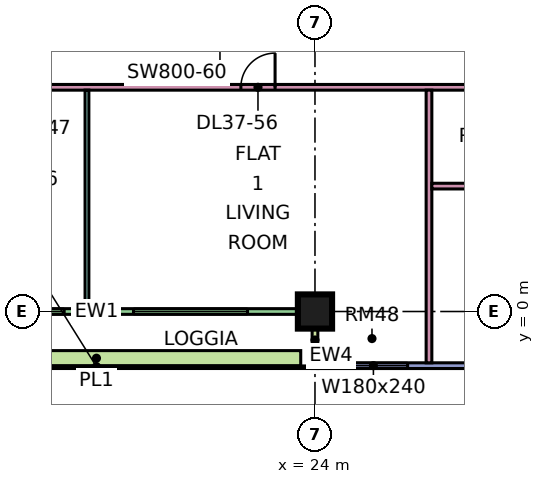
"""IFC4 building model, lengths in metres.
Left out: names, types, materials, properties, quantities, classifications, styles, units other than length and angle.
Written with IfcOpenShell. Run it as: python <this file> out.ifc"""

import sys

from ifc_helpers import new_model, si_unit, direction, frame, frame_2d, origin, origin_2d, place, context, subcontext, project, spatial, rectangle, extrude, element, fill, save


model = new_model("IFC4")
c1 = context("Model", 3, precision=1e-05, world=origin(), true_north=direction((0.0, 1.0)))
c2 = subcontext(c1, "Body", "Model", "MODEL_VIEW")
j1 = project(units=[si_unit("LENGTHUNIT", "METRE"), si_unit("PLANEANGLEUNIT", "RADIAN")], contexts=[c1])
p1 = place(None, origin())
s1 = spatial("IfcSite", under=j1, at=p1, CompositionType="ELEMENT")
p2 = place(p1, origin())
s2 = spatial("IfcBuilding", under=s1, at=p2, CompositionType="ELEMENT")
p3 = place(p2, frame((0.0, 0.0, 164.9)))
s3 = spatial("IfcBuildingStorey", under=s2, at=p3, CompositionType="ELEMENT", Elevation=164.9)
p4 = place(p3, frame((24.0, 0.0, 0.0), z_axis=(0.0, 0.0, 1.0), x_axis=(1.0, 0.0, 0.0)))
e1 = element("IfcColumn", 1, at=p4, inside=s3, PredefinedType="COLUMN", context=c2, shape_type="SweptSolid", body=[
    extrude(rectangle(XDim=0.9, YDim=0.9, at=origin_2d()), origin(), (0.0, 0.0, 1.0), 3.75),
])
p5 = place(p3, frame((12.575, 0.0, 0.0), z_axis=(0.0, 0.0, 1.0), x_axis=(1.0, 0.0, 0.0)))
e2 = element("IfcWall", 2, at=p5, inside=s3, PredefinedType="SOLIDWALL", context=c2, shape_type="SweptSolid", body=[
    extrude(rectangle(XDim=11.35, YDim=0.15, at=frame_2d((5.675, 0.0))), origin(), (0.0, 0.0, 1.0), 3.35),
])
p6 = place(p5, frame((0.613, 0.0, 0.0)))
e3 = element("IfcOpeningElement", 3, at=p6, cuts=e2, PredefinedType="OPENING", context=c2, shape_type="SweptSolid", body=[
    extrude(rectangle(XDim=1.2, YDim=2.4, at=frame_2d((0.6, 1.2))), frame((0.0, 0.085, 0.0), z_axis=(0.0, -1.0, 0.0), x_axis=(1.0, 0.0, 0.0)), (0.0, 0.0, 1.0), 0.17),
])
p7 = place(p5, frame((3.025, 0.0, 0.45)))
e4 = element("IfcOpeningElement", 4, at=p7, cuts=e2, PredefinedType="OPENING", context=c2, shape_type="SweptSolid", body=[
    extrude(rectangle(XDim=1.8, YDim=2.4, at=frame_2d((0.9, 1.2))), frame((0.0, 0.085, 0.0), z_axis=(0.0, -1.0, 0.0), x_axis=(1.0, 0.0, 0.0)), (0.0, 0.0, 1.0), 0.17),
])
p8 = place(p5, frame((6.65, 0.0, 0.45)))
e5 = element("IfcOpeningElement", 5, at=p8, cuts=e2, PredefinedType="OPENING", context=c2, shape_type="SweptSolid", body=[
    extrude(rectangle(XDim=3.0, YDim=2.4, at=frame_2d((1.5, 1.2))), frame((0.0, 0.085, 0.0), z_axis=(0.0, -1.0, 0.0), x_axis=(1.0, 0.0, 0.0)), (0.0, 0.0, 1.0), 0.17),
])
p9 = place(p3, frame((24.0, -1.5, 0.0), z_axis=(0.0, 0.0, 1.0), x_axis=(0.0, 1.0, 0.0)))
e6 = element("IfcWall", 6, at=p9, inside=s3, PredefinedType="SOLIDWALL", context=c2, shape_type="SweptSolid", body=[
    extrude(rectangle(XDim=1.5, YDim=0.15, at=frame_2d((0.75, 0.0))), origin(), (0.0, 0.0, 1.0), 3.35),
])
p10 = place(p3, frame((24.075, -1.425, 0.0), z_axis=(0.0, 0.0, 1.0), x_axis=(1.0, 0.0, 0.0)))
e7 = element("IfcWall", 7, at=p10, inside=s3, PredefinedType="SOLIDWALL", context=c2, shape_type="SweptSolid", body=[
    extrude(rectangle(XDim=11.85, YDim=0.15, at=frame_2d((5.925, 0.0))), origin(), (0.0, 0.0, 1.0), 3.35),
])
p11 = place(p10, frame((0.562, 0.0, 0.45)))
e8 = element("IfcOpeningElement", 8, at=p11, cuts=e7, PredefinedType="OPENING", context=c2, shape_type="SweptSolid", body=[
    extrude(rectangle(XDim=1.8, YDim=2.4, at=frame_2d((0.9, 1.2))), frame((0.0, 0.085, 0.0), z_axis=(0.0, -1.0, 0.0), x_axis=(1.0, 0.0, 0.0)), (0.0, 0.0, 1.0), 0.17),
])
p12 = place(p10, frame((4.425, 0.0, 0.45)))
e9 = element("IfcOpeningElement", 9, at=p12, cuts=e7, PredefinedType="OPENING", context=c2, shape_type="SweptSolid", body=[
    extrude(rectangle(XDim=3.0, YDim=2.4, at=frame_2d((1.5, 1.2))), frame((0.0, 0.085, 0.0), z_axis=(0.0, -1.0, 0.0), x_axis=(1.0, 0.0, 0.0)), (0.0, 0.0, 1.0), 0.17),
])
p13 = place(p10, frame((9.488, 0.0, 0.45)))
e10 = element("IfcOpeningElement", 10, at=p13, cuts=e7, PredefinedType="OPENING", context=c2, shape_type="SweptSolid", body=[
    extrude(rectangle(XDim=1.8, YDim=2.4, at=frame_2d((0.9, 1.2))), frame((0.0, 0.085, 0.0), z_axis=(0.0, -1.0, 0.0), x_axis=(1.0, 0.0, 0.0)), (0.0, 0.0, 1.0), 0.17),
])
p14 = place(p3, frame((12.875, -1.229, 0.0), z_axis=(0.0, 0.0, 1.0), x_axis=(1.0, 0.0, 0.0)))
e11 = element("IfcWall", 11, at=p14, inside=s3, PredefinedType="SOLIDWALL", context=c2, shape_type="SweptSolid", body=[
    extrude(rectangle(XDim=10.75, YDim=0.4, at=frame_2d((5.375, 0.0))), origin(), (0.0, 0.0, 1.0), 0.7),
])
p15 = place(p3, frame((11.95, 5.9, 0.0), z_axis=(0.0, 0.0, 1.0), x_axis=(1.0, 0.0, 0.0)))
e12 = element("IfcWall", 12, at=p15, inside=s3, PredefinedType="PARTITIONING", context=c2, shape_type="SweptSolid", body=[
    extrude(rectangle(XDim=21.1, YDim=0.15, at=frame_2d((10.55, 0.0))), origin(), (0.0, 0.0, 1.0), 3.35),
])
p16 = place(p15, frame((1.1, 0.0, 0.0)))
e13 = element("IfcOpeningElement", 13, at=p16, cuts=e12, PredefinedType="OPENING", context=c2, shape_type="SweptSolid", body=[
    extrude(rectangle(XDim=0.9, YDim=2.1, at=frame_2d((0.45, 1.05))), frame((0.0, 0.085, 0.0), z_axis=(0.0, -1.0, 0.0), x_axis=(1.0, 0.0, 0.0)), (0.0, 0.0, 1.0), 0.17),
])
p17 = place(p15, frame((4.1, 0.0, 0.0)))
e14 = element("IfcOpeningElement", 14, at=p17, cuts=e12, PredefinedType="OPENING", context=c2, shape_type="SweptSolid", body=[
    extrude(rectangle(XDim=0.9, YDim=2.1, at=frame_2d((0.45, 1.05))), frame((0.0, 0.085, 0.0), z_axis=(0.0, -1.0, 0.0), x_axis=(1.0, 0.0, 0.0)), (0.0, 0.0, 1.0), 0.17),
])
p18 = place(p15, frame((10.1, 0.0, 0.0)))
e15 = element("IfcOpeningElement", 15, at=p18, cuts=e12, PredefinedType="OPENING", context=c2, shape_type="SweptSolid", body=[
    extrude(rectangle(XDim=0.9, YDim=2.1, at=frame_2d((0.45, 1.05))), frame((0.0, 0.085, 0.0), z_axis=(0.0, -1.0, 0.0), x_axis=(1.0, 0.0, 0.0)), (0.0, 0.0, 1.0), 0.17),
])
p19 = place(p3, frame((18.0, 0.074, 0.0), z_axis=(0.0, 0.0, 1.0), x_axis=(0.0, 1.0, 0.0)))
e16 = element("IfcWall", 16, at=p19, inside=s3, PredefinedType="PARTITIONING", context=c2, shape_type="SweptSolid", body=[
    extrude(rectangle(XDim=5.751, YDim=0.1, at=frame_2d((2.875, 0.0))), origin(), (0.0, 0.0, 1.0), 3.35),
])
p20 = place(p3, frame((27.0, -1.35, 0.0), z_axis=(0.0, 0.0, 1.0), x_axis=(0.0, 1.0, 0.0)))
e17 = element("IfcWall", 17, at=p20, inside=s3, PredefinedType="PARTITIONING", context=c2, shape_type="SweptSolid", body=[
    extrude(rectangle(XDim=7.175, YDim=0.15, at=frame_2d((3.587, 0.0))), origin(), (0.0, 0.0, 1.0), 3.35),
])
p21 = place(p3, frame((27.075, 3.3, 0.0), z_axis=(0.0, 0.0, 1.0), x_axis=(1.0, 0.0, 0.0)))
e18 = element("IfcWall", 18, at=p21, inside=s3, PredefinedType="PARTITIONING", context=c2, shape_type="SweptSolid", body=[
    extrude(rectangle(XDim=3.0, YDim=0.15, at=frame_2d((1.5, 0.0))), origin(), (0.0, 0.0, 1.0), 3.35),
])
p22 = place(p7, origin())
e19 = element("IfcWindow", 19, at=p22, inside=s3, PartitioningType="SINGLE_PANEL", PredefinedType="WINDOW", context=c2, shape_type="SweptSolid", body=[
    extrude(rectangle(XDim=1.8, YDim=2.4, at=frame_2d((0.9, 1.2))), frame((0.0, 0.03, 0.0), z_axis=(0.0, -1.0, 0.0), x_axis=(1.0, 0.0, 0.0)), (0.0, 0.0, 1.0), 0.06),
])
fill(e4, e19)
p23 = place(p8, origin())
e20 = element("IfcWindow", 20, at=p23, inside=s3, PartitioningType="SINGLE_PANEL", PredefinedType="WINDOW", context=c2, shape_type="SweptSolid", body=[
    extrude(rectangle(XDim=3.0, YDim=2.4, at=frame_2d((1.5, 1.2))), frame((0.0, 0.03, 0.0), z_axis=(0.0, -1.0, 0.0), x_axis=(1.0, 0.0, 0.0)), (0.0, 0.0, 1.0), 0.06),
])
fill(e5, e20)
p24 = place(p11, origin())
e21 = element("IfcWindow", 21, at=p24, inside=s3, PartitioningType="SINGLE_PANEL", PredefinedType="WINDOW", context=c2, shape_type="SweptSolid", body=[
    extrude(rectangle(XDim=1.8, YDim=2.4, at=frame_2d((0.9, 1.2))), frame((0.0, 0.03, 0.0), z_axis=(0.0, -1.0, 0.0), x_axis=(1.0, 0.0, 0.0)), (0.0, 0.0, 1.0), 0.06),
])
fill(e8, e21)
p25 = place(p18, frame((0.9, 0.0, 0.0), z_axis=(0.0, 0.0, 1.0), x_axis=(-1.0, 0.0, 0.0)))
e22 = element("IfcDoor", 22, at=p25, inside=s3, OperationType="SINGLE_SWING_RIGHT", PredefinedType="DOOR", context=c2, shape_type="SweptSolid", body=[
    extrude(rectangle(XDim=0.9, YDim=2.1, at=frame_2d((0.45, 1.05))), frame((0.0, 0.025, 0.0), z_axis=(0.0, -1.0, 0.0), x_axis=(1.0, 0.0, 0.0)), (0.0, 0.0, 1.0), 0.05),
])
fill(e15, e22)
save(model, sys.argv[1])
